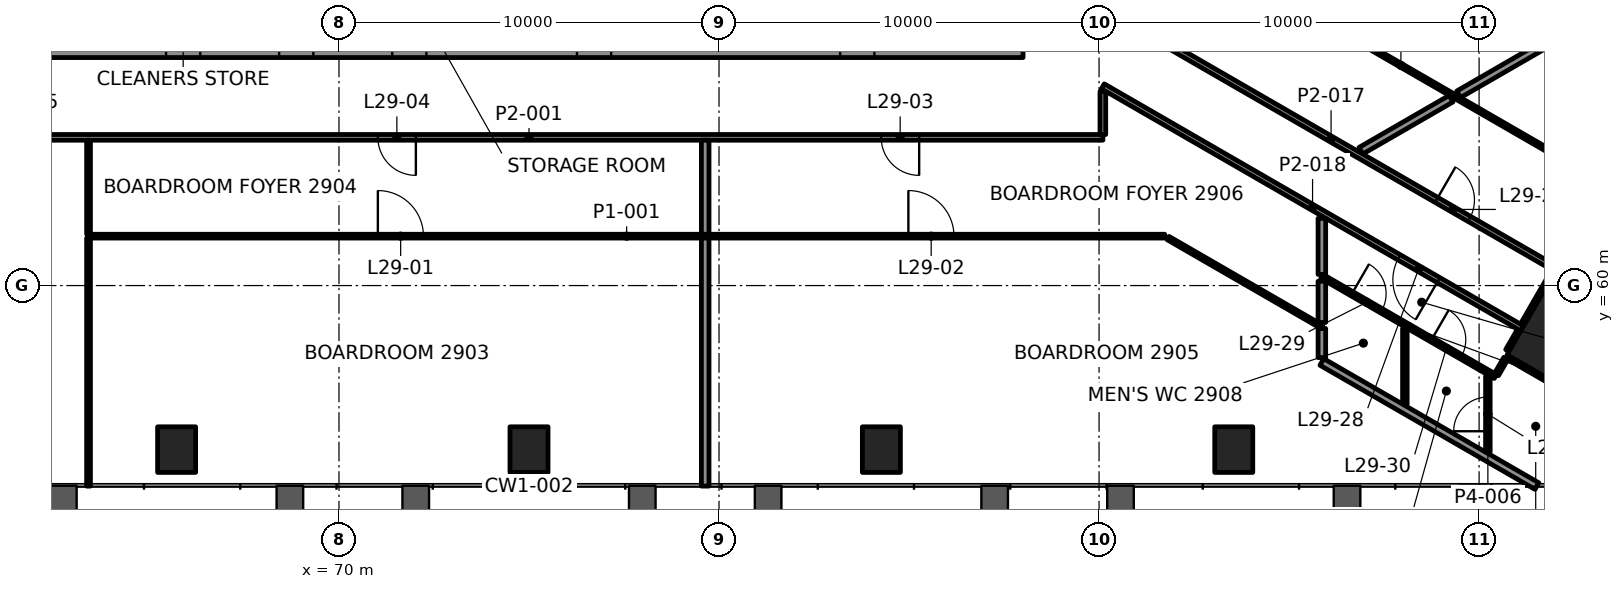
"""IFC4 building model, lengths in metres.
Left out: names, types, materials, properties, quantities, classifications, styles, units other than length and angle.
Written with IfcOpenShell. Run it as: python <this file> out.ifc"""

import sys

from ifc_helpers import new_model, si_unit, direction, frame, frame_2d, origin, origin_2d, place, context, subcontext, project, spatial, rectangle, extrude, element, fill, save


model = new_model("IFC4")
c1 = context("Model", 3, precision=1e-05, world=origin(), true_north=direction((0.0, 1.0)))
c2 = subcontext(c1, "Body", "Model", "MODEL_VIEW")
j1 = project(units=[si_unit("LENGTHUNIT", "METRE"), si_unit("PLANEANGLEUNIT", "RADIAN")], contexts=[c1])
p1 = place(None, origin())
s1 = spatial("IfcSite", under=j1, at=p1, CompositionType="ELEMENT")
p2 = place(p1, origin())
s2 = spatial("IfcBuilding", under=s1, at=p2, CompositionType="ELEMENT")
p3 = place(p2, frame((0.0, 0.0, 128.2)))
s3 = spatial("IfcBuildingStorey", under=s2, at=p3, CompositionType="ELEMENT", Elevation=128.2)
p4 = place(p3, frame((103.058, 58.801, 0.0), z_axis=(0.0, 0.0, 1.0), x_axis=(0.5, 0.866025403784, 0.0)))
e1 = element("IfcColumn", 1, at=p4, inside=s3, PredefinedType="COLUMN", context=c2, shape_type="SweptSolid", body=[
    extrude(rectangle(XDim=3.4, YDim=3.4, at=origin_2d()), origin(), (0.0, 0.0, 1.0), 4.2),
])
for number, where, z_axis, x_axis in (
    (2, (65.728, 55.683, -0.0), (0.0, 0.0, 1.0), (1.0, 0.0, 0.0)),
    (3, (75.0, 55.683, -0.0), (0.0, 0.0, 1.0), (1.0, 0.0, 0.0)),
    (4, (84.272, 55.683, -0.0), (0.0, 0.0, 1.0), (1.0, 0.0, 0.0)),
    (5, (93.545, 55.683, -0.0), (0.0, 0.0, 1.0), (1.0, 0.0, 0.0)),
):
    element("IfcColumn", number, at=place(p3, frame(where, z_axis=z_axis, x_axis=x_axis)), inside=s3, PredefinedType="COLUMN", context=c2, shape_type="SweptSolid", body=[
        extrude(rectangle(XDim=1.0, YDim=1.2, at=origin_2d()), origin(), (0.0, 0.0, 1.0), 4.2),
    ])
p5 = place(p3, frame((62.0, 66.45, 0.0), z_axis=(0.0, 0.0, 1.0), x_axis=(1.0, 0.0, 0.0)))
e6 = element("IfcWall", 6, at=p5, inside=s3, PredefinedType="SHEAR", context=c2, shape_type="SweptSolid", body=[
    extrude(rectangle(XDim=26.0, YDim=0.9, at=frame_2d((13.0, 0.0))), origin(), (0.0, 0.0, 1.0), 4.0),
])
p6 = place(p5, frame((3.45, 0.0, 0.0)))
e7 = element("IfcOpeningElement", 7, at=p6, cuts=e6, PredefinedType="OPENING", context=c2, shape_type="SweptSolid", body=[
    extrude(rectangle(XDim=0.9, YDim=2.1, at=frame_2d((0.45, 1.05))), frame((0.0, 0.46, 0.0), z_axis=(0.0, -1.0, 0.0), x_axis=(1.0, 0.0, 0.0)), (0.0, 0.0, 1.0), 0.92),
])
p7 = place(p5, frame((6.425, 0.0, 0.0)))
e8 = element("IfcOpeningElement", 8, at=p7, cuts=e6, PredefinedType="OPENING", context=c2, shape_type="SweptSolid", body=[
    extrude(rectangle(XDim=0.9, YDim=2.1, at=frame_2d((0.45, 1.05))), frame((0.0, 0.46, 0.0), z_axis=(0.0, -1.0, 0.0), x_axis=(1.0, 0.0, 0.0)), (0.0, 0.0, 1.0), 0.92),
])
p8 = place(p5, frame((9.4, 0.0, 0.0)))
e9 = element("IfcOpeningElement", 9, at=p8, cuts=e6, PredefinedType="OPENING", context=c2, shape_type="SweptSolid", body=[
    extrude(rectangle(XDim=0.9, YDim=2.1, at=frame_2d((0.45, 1.05))), frame((0.0, 0.46, 0.0), z_axis=(0.0, -1.0, 0.0), x_axis=(1.0, 0.0, 0.0)), (0.0, 0.0, 1.0), 0.92),
])
p9 = place(p5, frame((14.262, 0.0, 0.0)))
e10 = element("IfcOpeningElement", 10, at=p9, cuts=e6, PredefinedType="OPENING", context=c2, shape_type="SweptSolid", body=[
    extrude(rectangle(XDim=0.9, YDim=2.1, at=frame_2d((0.45, 1.05))), frame((0.0, 0.46, 0.0), z_axis=(0.0, -1.0, 0.0), x_axis=(1.0, 0.0, 0.0)), (0.0, 0.0, 1.0), 0.92),
])
p10 = place(p5, frame((21.188, 0.0, 0.0)))
e11 = element("IfcOpeningElement", 11, at=p10, cuts=e6, PredefinedType="OPENING", context=c2, shape_type="SweptSolid", body=[
    extrude(rectangle(XDim=0.9, YDim=2.1, at=frame_2d((0.45, 1.05))), frame((0.0, 0.46, 0.0), z_axis=(0.0, -1.0, 0.0), x_axis=(1.0, 0.0, 0.0)), (0.0, 0.0, 1.0), 0.92),
])
p11 = place(p3, frame((63.41, 61.3, 0.0), z_axis=(0.0, 0.0, 1.0), x_axis=(1.0, 0.0, 0.0)))
e12 = element("IfcWall", 12, at=p11, inside=s3, PredefinedType="PARTITIONING", context=c2, shape_type="SweptSolid", body=[
    extrude(rectangle(XDim=28.319, YDim=0.1, at=frame_2d((14.16, 0.0))), origin(), (0.0, 0.0, 1.0), 3.4),
])
p12 = place(p11, frame((7.613, 0.0, 0.0)))
e13 = element("IfcOpeningElement", 13, at=p12, cuts=e12, PredefinedType="OPENING", context=c2, shape_type="SweptSolid", body=[
    extrude(rectangle(XDim=1.2, YDim=2.1, at=frame_2d((0.6, 1.05))), frame((0.0, 0.06, 0.0), z_axis=(0.0, -1.0, 0.0), x_axis=(1.0, 0.0, 0.0)), (0.0, 0.0, 1.0), 0.12),
])
p13 = place(p11, frame((21.573, 0.0, 0.0)))
e14 = element("IfcOpeningElement", 14, at=p13, cuts=e12, PredefinedType="OPENING", context=c2, shape_type="SweptSolid", body=[
    extrude(rectangle(XDim=1.2, YDim=2.1, at=frame_2d((0.6, 1.05))), frame((0.0, 0.06, 0.0), z_axis=(0.0, -1.0, 0.0), x_axis=(1.0, 0.0, 0.0)), (0.0, 0.0, 1.0), 0.12),
])
p14 = place(p3, frame((90.1, 63.9, 0.0), z_axis=(0.0, 0.0, 1.0), x_axis=(-1.0, 0.0, 0.0)))
e15 = element("IfcWall", 15, at=p14, inside=s3, PredefinedType="PARTITIONING", context=c2, shape_type="SweptSolid", body=[
    extrude(rectangle(XDim=30.2, YDim=0.15, at=frame_2d((15.1, 0.0))), origin(), (0.0, 0.0, 1.0), 3.4),
])
p15 = place(p14, frame((4.833, 0.0, 0.0)))
e16 = element("IfcOpeningElement", 16, at=p15, cuts=e15, PredefinedType="OPENING", context=c2, shape_type="SweptSolid", body=[
    extrude(rectangle(XDim=1.0, YDim=2.1, at=frame_2d((0.5, 1.05))), frame((0.0, 0.085, 0.0), z_axis=(0.0, -1.0, 0.0), x_axis=(1.0, 0.0, 0.0)), (0.0, 0.0, 1.0), 0.17),
])
p16 = place(p14, frame((18.077, 0.0, 0.0)))
e17 = element("IfcOpeningElement", 17, at=p16, cuts=e15, PredefinedType="OPENING", context=c2, shape_type="SweptSolid", body=[
    extrude(rectangle(XDim=1.0, YDim=2.1, at=frame_2d((0.5, 1.05))), frame((0.0, 0.085, 0.0), z_axis=(0.0, -1.0, 0.0), x_axis=(1.0, 0.0, 0.0)), (0.0, 0.0, 1.0), 0.17),
])
p17 = place(p14, frame((27.893, 0.0, 0.0)))
e18 = element("IfcOpeningElement", 18, at=p17, cuts=e15, PredefinedType="OPENING", context=c2, shape_type="SweptSolid", body=[
    extrude(rectangle(XDim=0.9, YDim=2.1, at=frame_2d((0.45, 1.05))), frame((0.0, 0.085, 0.0), z_axis=(0.0, -1.0, 0.0), x_axis=(1.0, 0.0, 0.0)), (0.0, 0.0, 1.0), 0.17),
])
p18 = place(p3, frame((96.89, 63.548, 0.0), z_axis=(0.0, 0.0, 1.0), x_axis=(0.86604168154, 0.499971805041, 0.0)))
e19 = element("IfcWall", 19, at=p18, inside=s3, PredefinedType="PARTITIONING", context=c2, shape_type="SweptSolid", body=[
    extrude(rectangle(XDim=2.74, YDim=0.2, at=frame_2d((1.37, 0.0))), origin(), (0.0, 0.0, 1.0), 3.4),
])
p19 = place(p3, frame((100.458, 57.658, 0.0), z_axis=(0.0, 0.0, 1.0), x_axis=(0.499895202697, 0.866085900082, 0.0)))
e20 = element("IfcWall", 20, at=p19, inside=s3, PredefinedType="PARTITIONING", context=c2, shape_type="SweptSolid", body=[
    extrude(rectangle(XDim=0.489, YDim=0.12, at=frame_2d((0.245, 0.0))), origin(), (0.0, 0.0, 1.0), 3.4),
])
p20 = place(p3, frame((100.786, 58.265, 0.0), z_axis=(0.0, 0.0, 1.0), x_axis=(0.499880341542, 0.866094477606, 0.0)))
e21 = element("IfcWall", 21, at=p20, inside=s3, PredefinedType="PARTITIONING", context=c2, shape_type="SweptSolid", body=[
    extrude(rectangle(XDim=0.625, YDim=0.2, at=frame_2d((0.312, 0.0))), origin(), (0.0, 0.0, 1.0), 3.4),
])
p21 = place(p3, frame((100.231, 55.623, 0.0), z_axis=(0.0, 0.0, 1.0), x_axis=(0.0, 1.0, 0.0)))
e22 = element("IfcWall", 22, at=p21, inside=s3, PredefinedType="PARTITIONING", context=c2, shape_type="SweptSolid", body=[
    extrude(rectangle(XDim=1.987, YDim=0.12, at=frame_2d((0.993, 0.0))), origin(), (0.0, 0.0, 1.0), 3.4),
])
p22 = place(p21, frame((0.543, 0.0, 0.0)))
e23 = element("IfcOpeningElement", 23, at=p22, cuts=e22, PredefinedType="OPENING", context=c2, shape_type="SweptSolid", body=[
    extrude(rectangle(XDim=0.9, YDim=2.1, at=frame_2d((0.45, 1.05))), frame((0.0, 0.07, 0.0), z_axis=(0.0, -1.0, 0.0), x_axis=(1.0, 0.0, 0.0)), (0.0, 0.0, 1.0), 0.14),
])
p23 = place(p3, frame((98.047, 56.884, 0.0), z_axis=(0.0, 0.0, 1.0), x_axis=(0.0, 1.0, 0.0)))
e24 = element("IfcWall", 24, at=p23, inside=s3, PredefinedType="PARTITIONING", context=c2, shape_type="SweptSolid", body=[
    extrude(rectangle(XDim=1.987, YDim=0.12, at=frame_2d((0.993, 0.0))), origin(), (0.0, 0.0, 1.0), 3.4),
])
p24 = place(p3, frame((95.863, 58.105, 0.0), z_axis=(0.0, 0.0, 1.0), x_axis=(0.0, 1.0, 0.0)))
e25 = element("IfcWall", 25, at=p24, inside=s3, PredefinedType="PARTITIONING", context=c2, shape_type="SweptSolid", body=[
    extrude(rectangle(XDim=0.765, YDim=0.2, at=frame_2d((0.383, 0.0))), origin(), (0.0, 0.0, 1.0), 3.4),
])
p25 = place(p3, frame((90.1, 63.975, 0.0), z_axis=(0.0, 0.0, 1.0), x_axis=(0.0, 1.0, 0.0)))
e26 = element("IfcWall", 26, at=p25, inside=s3, PredefinedType="PARTITIONING", context=c2, shape_type="SweptSolid", body=[
    extrude(rectangle(XDim=1.131, YDim=0.15, at=frame_2d((0.565, 0.0))), origin(), (0.0, 0.0, 1.0), 3.247),
])
p26 = place(p3, frame((79.636, 54.723, 0.0), z_axis=(0.0, 0.0, 1.0), x_axis=(0.0, 1.0, 0.0)))
e27 = element("IfcWall", 27, at=p26, inside=s3, PredefinedType="PARTITIONING", context=c2, shape_type="SweptSolid", body=[
    extrude(rectangle(XDim=6.527, YDim=0.2, at=frame_2d((3.264, 0.0))), origin(), (0.0, 0.0, 1.0), 3.165),
])
p27 = place(p3, frame((63.41, 54.723, 0.0), z_axis=(0.0, 0.0, 1.0), x_axis=(0.0, 1.0, 0.0)))
e28 = element("IfcWall", 28, at=p27, inside=s3, PredefinedType="PARTITIONING", context=c2, shape_type="SweptSolid", body=[
    extrude(rectangle(XDim=6.527, YDim=0.1, at=frame_2d((3.264, 0.0))), origin(), (0.0, 0.0, 1.0), 3.165),
])
p28 = place(p3, frame((103.185, 62.769, 0.0), z_axis=(0.0, 0.0, 1.0), x_axis=(-0.866024396652, 0.5000017444, 0.0)))
e29 = element("IfcWall", 29, at=p28, inside=s3, PredefinedType="PARTITIONING", context=c2, shape_type="SweptSolid", body=[
    extrude(rectangle(XDim=12.107, YDim=0.1, at=frame_2d((6.053, 0.0))), origin(), (0.0, 0.0, 1.0), 3.4),
])
p29 = place(p3, frame((90.175, 67.278, 0.0), z_axis=(0.0, 0.0, 1.0), x_axis=(0.866022903348, -0.500004330858, 0.0)))
e30 = element("IfcWall", 30, at=p29, inside=s3, PredefinedType="PARTITIONING", context=c2, shape_type="SweptSolid", body=[
    extrude(rectangle(XDim=13.695, YDim=0.15, at=frame_2d((6.848, 0.0))), origin(), (0.0, 0.0, 1.0), 3.4),
])
p30 = place(p29, frame((10.05, 0.0, 0.0)))
e31 = element("IfcOpeningElement", 31, at=p30, cuts=e30, PredefinedType="OPENING", context=c2, shape_type="SweptSolid", body=[
    extrude(rectangle(XDim=1.0, YDim=2.1, at=frame_2d((0.5, 1.05))), frame((0.0, 0.085, 0.0), z_axis=(0.0, -1.0, 0.0), x_axis=(1.0, 0.0, 0.0)), (0.0, 0.0, 1.0), 0.17),
])
p31 = place(p3, frame((101.136, 58.871, 0.0), z_axis=(0.0, 0.0, 1.0), x_axis=(-0.866020317169, 0.500008810174, 0.0)))
e32 = element("IfcWall", 32, at=p31, inside=s3, PredefinedType="PARTITIONING", context=c2, shape_type="SweptSolid", body=[
    extrude(rectangle(XDim=12.743, YDim=0.15, at=frame_2d((6.372, 0.0))), origin(), (0.0, 0.0, 1.0), 3.247),
])
p32 = place(p31, frame((2.546, 0.0, 0.0)))
e33 = element("IfcOpeningElement", 33, at=p32, cuts=e32, PredefinedType="OPENING", context=c2, shape_type="SweptSolid", body=[
    extrude(rectangle(XDim=1.2, YDim=2.1, at=frame_2d((0.6, 1.05))), frame((0.0, 0.085, 0.0), z_axis=(0.0, -1.0, 0.0), x_axis=(1.0, 0.0, 0.0)), (0.0, 0.0, 1.0), 0.17),
])
p33 = place(p3, frame((103.819, 56.398, 0.0), z_axis=(0.0, 0.0, 1.0), x_axis=(-0.866004308173, 0.500036536891, 0.0)))
e34 = element("IfcWall", 34, at=p33, inside=s3, PredefinedType="PARTITIONING", context=c2, shape_type="SweptSolid", body=[
    extrude(rectangle(XDim=3.544, YDim=0.2, at=frame_2d((1.772, 0.0))), origin(), (0.0, 0.0, 1.0), 3.4),
])
p34 = place(p3, frame((95.863, 60.241, 0.0), z_axis=(0.0, 0.0, 1.0), x_axis=(0.866028224559, -0.499995114243, 0.0)))
e35 = element("IfcWall", 35, at=p34, inside=s3, PredefinedType="PARTITIONING", context=c2, shape_type="SweptSolid", body=[
    extrude(rectangle(XDim=5.271, YDim=0.12, at=frame_2d((2.635, 0.0))), origin(), (0.0, 0.0, 1.0), 3.4),
])
p35 = place(p34, frame((0.913, 0.0, 0.0)))
e36 = element("IfcOpeningElement", 36, at=p35, cuts=e35, PredefinedType="OPENING", context=c2, shape_type="SweptSolid", body=[
    extrude(rectangle(XDim=0.9, YDim=2.1, at=frame_2d((0.45, 1.05))), frame((0.0, 0.07, 0.0), z_axis=(0.0, -1.0, 0.0), x_axis=(1.0, 0.0, 0.0)), (0.0, 0.0, 1.0), 0.14),
])
p36 = place(p34, frame((3.333, 0.0, 0.0)))
e37 = element("IfcOpeningElement", 37, at=p36, cuts=e35, PredefinedType="OPENING", context=c2, shape_type="SweptSolid", body=[
    extrude(rectangle(XDim=0.9, YDim=2.1, at=frame_2d((0.45, 1.05))), frame((0.0, 0.07, 0.0), z_axis=(0.0, -1.0, 0.0), x_axis=(1.0, 0.0, 0.0)), (0.0, 0.0, 1.0), 0.14),
])
p37 = place(p3, frame((95.863, 58.914, 0.0), z_axis=(0.0, 0.0, 1.0), x_axis=(-0.866042039906, 0.499971184285, 0.0)))
e38 = element("IfcWall", 38, at=p37, inside=s3, PredefinedType="PARTITIONING", context=c2, shape_type="SweptSolid", body=[
    extrude(rectangle(XDim=4.673, YDim=0.1, at=frame_2d((2.336, 0.0))), origin(), (0.0, 0.0, 1.0), 3.4),
])
p38 = place(p3, frame((101.521, 54.723, 0.0), z_axis=(0.0, 0.0, 1.0), x_axis=(-0.866020061583, 0.50000925285, 0.0)))
e39 = element("IfcWall", 39, at=p38, inside=s3, PredefinedType="PARTITIONING", context=c2, shape_type="SweptSolid", body=[
    extrude(rectangle(XDim=6.534, YDim=0.2, at=frame_2d((3.267, 0.0))), origin(), (0.0, 0.0, 1.0), 3.4),
])
p39 = place(p3, frame((79.636, 61.35, 0.0), z_axis=(0.0, 0.0, 1.0), x_axis=(0.0, 1.0, 0.0)))
e40 = element("IfcWall", 40, at=p39, inside=s3, PredefinedType="PARTITIONING", context=c2, shape_type="SweptSolid", body=[
    extrude(rectangle(XDim=2.475, YDim=0.2, at=frame_2d((1.237, 0.0))), origin(), (0.0, 0.0, 1.0), 3.4),
])
p40 = place(p3, frame((99.463, 65.033, 0.0), z_axis=(0.0, 0.0, 1.0), x_axis=(0.866014978466, 0.500018056747, 0.0)))
e41 = element("IfcWall", 41, at=p40, inside=s3, PredefinedType="PARTITIONING", context=c2, shape_type="SweptSolid", body=[
    extrude(rectangle(XDim=4.075, YDim=0.2, at=frame_2d((2.038, 0.0))), origin(), (0.0, 0.0, 1.0), 3.4),
])
p41 = place(p3, frame((101.174, 58.936, 0.0), z_axis=(0.0, 0.0, 1.0), x_axis=(0.499991515992, 0.866030301974, 0.0)))
e42 = element("IfcWall", 42, at=p41, inside=s3, PredefinedType="PARTITIONING", context=c2, shape_type="SweptSolid", body=[
    extrude(rectangle(XDim=1.649, YDim=0.2, at=frame_2d((0.825, 0.0))), origin(), (0.0, 0.0, 1.0), 3.247),
])
p42 = place(p3, frame((95.863, 60.293, 0.0), z_axis=(0.0, 0.0, 1.0), x_axis=(0.0, 1.0, 0.0)))
e43 = element("IfcWall", 43, at=p42, inside=s3, PredefinedType="PARTITIONING", context=c2, shape_type="SweptSolid", body=[
    extrude(rectangle(XDim=1.476, YDim=0.2, at=frame_2d((0.738, 0.0))), origin(), (0.0, 0.0, 1.0), 3.4),
])
p43 = place(p3, frame((63.41, 61.35, 0.0), z_axis=(0.0, 0.0, 1.0), x_axis=(0.0, 1.0, 0.0)))
e44 = element("IfcWall", 44, at=p43, inside=s3, PredefinedType="PARTITIONING", context=c2, shape_type="SweptSolid", body=[
    extrude(rectangle(XDim=2.475, YDim=0.1, at=frame_2d((1.237, 0.0))), origin(), (0.0, 0.0, 1.0), 3.4),
])
p44 = place(p3, frame((95.863, 59.029, 0.0), z_axis=(0.0, 0.0, 1.0), x_axis=(0.0, 1.0, 0.0)))
e45 = element("IfcWall", 45, at=p44, inside=s3, PredefinedType="PARTITIONING", context=c2, shape_type="SweptSolid", body=[
    extrude(rectangle(XDim=1.085, YDim=0.2, at=frame_2d((0.543, 0.0))), origin(), (0.0, 0.0, 1.0), 3.4),
])
p45 = place(p12, origin())
e46 = element("IfcDoor", 46, at=p45, inside=s3, OperationType="DOUBLE_DOOR_SINGLE_SWING", PredefinedType="DOOR", context=c2, shape_type="SweptSolid", body=[
    extrude(rectangle(XDim=1.2, YDim=2.1, at=frame_2d((0.6, 1.05))), frame((0.0, 0.025, 0.0), z_axis=(0.0, -1.0, 0.0), x_axis=(1.0, 0.0, 0.0)), (0.0, 0.0, 1.0), 0.05),
])
fill(e13, e46)
p46 = place(p13, origin())
e47 = element("IfcDoor", 47, at=p46, inside=s3, OperationType="DOUBLE_DOOR_SINGLE_SWING", PredefinedType="DOOR", context=c2, shape_type="SweptSolid", body=[
    extrude(rectangle(XDim=1.2, YDim=2.1, at=frame_2d((0.6, 1.05))), frame((0.0, 0.025, 0.0), z_axis=(0.0, -1.0, 0.0), x_axis=(1.0, 0.0, 0.0)), (0.0, 0.0, 1.0), 0.05),
])
fill(e14, e47)
p47 = place(p15, origin())
e48 = element("IfcDoor", 48, at=p47, inside=s3, OperationType="SINGLE_SWING_RIGHT", PredefinedType="DOOR", context=c2, shape_type="SweptSolid", body=[
    extrude(rectangle(XDim=1.0, YDim=2.1, at=frame_2d((0.5, 1.05))), frame((0.0, 0.025, 0.0), z_axis=(0.0, -1.0, 0.0), x_axis=(1.0, 0.0, 0.0)), (0.0, 0.0, 1.0), 0.05),
])
fill(e16, e48)
p48 = place(p16, origin())
e49 = element("IfcDoor", 49, at=p48, inside=s3, OperationType="SINGLE_SWING_RIGHT", PredefinedType="DOOR", context=c2, shape_type="SweptSolid", body=[
    extrude(rectangle(XDim=1.0, YDim=2.1, at=frame_2d((0.5, 1.05))), frame((0.0, 0.025, 0.0), z_axis=(0.0, -1.0, 0.0), x_axis=(1.0, 0.0, 0.0)), (0.0, 0.0, 1.0), 0.05),
])
fill(e17, e49)
p49 = place(p22, origin())
e50 = element("IfcDoor", 50, at=p49, inside=s3, OperationType="SINGLE_SWING_LEFT", PredefinedType="DOOR", context=c2, shape_type="SweptSolid", body=[
    extrude(rectangle(XDim=0.9, YDim=2.1, at=frame_2d((0.45, 1.05))), frame((0.0, 0.025, 0.0), z_axis=(0.0, -1.0, 0.0), x_axis=(1.0, 0.0, 0.0)), (0.0, 0.0, 1.0), 0.05),
])
fill(e23, e50)
p50 = place(p30, origin())
e51 = element("IfcDoor", 51, at=p50, inside=s3, OperationType="SINGLE_SWING_LEFT", PredefinedType="DOOR", context=c2, shape_type="SweptSolid", body=[
    extrude(rectangle(XDim=1.0, YDim=2.1, at=frame_2d((0.5, 1.05))), frame((0.0, 0.025, 0.0), z_axis=(0.0, -1.0, 0.0), x_axis=(1.0, 0.0, 0.0)), (0.0, 0.0, 1.0), 0.05),
])
fill(e31, e51)
p51 = place(p32, origin())
e52 = element("IfcDoor", 52, at=p51, inside=s3, OperationType="DOUBLE_DOOR_SINGLE_SWING", PredefinedType="DOOR", context=c2, shape_type="SweptSolid", body=[
    extrude(rectangle(XDim=1.2, YDim=2.1, at=frame_2d((0.6, 1.05))), frame((0.0, 0.025, 0.0), z_axis=(0.0, -1.0, 0.0), x_axis=(1.0, 0.0, 0.0)), (0.0, 0.0, 1.0), 0.05),
])
fill(e33, e52)
p52 = place(p35, origin())
e53 = element("IfcDoor", 53, at=p52, inside=s3, OperationType="SINGLE_SWING_RIGHT", PredefinedType="DOOR", context=c2, shape_type="SweptSolid", body=[
    extrude(rectangle(XDim=0.9, YDim=2.1, at=frame_2d((0.45, 1.05))), frame((0.0, 0.025, 0.0), z_axis=(0.0, -1.0, 0.0), x_axis=(1.0, 0.0, 0.0)), (0.0, 0.0, 1.0), 0.05),
])
fill(e36, e53)
p53 = place(p36, origin())
e54 = element("IfcDoor", 54, at=p53, inside=s3, OperationType="SINGLE_SWING_LEFT", PredefinedType="DOOR", context=c2, shape_type="SweptSolid", body=[
    extrude(rectangle(XDim=0.9, YDim=2.1, at=frame_2d((0.45, 1.05))), frame((0.0, 0.025, 0.0), z_axis=(0.0, -1.0, 0.0), x_axis=(1.0, 0.0, 0.0)), (0.0, 0.0, 1.0), 0.05),
])
fill(e37, e54)
save(model, sys.argv[1])
